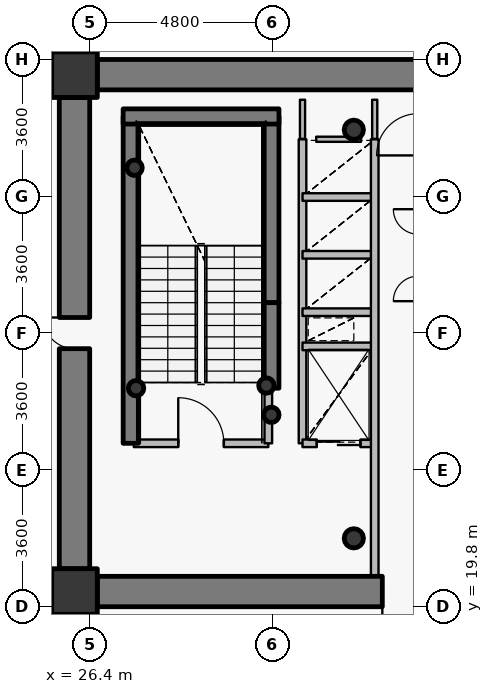
"""IFC4 building model, lengths in metres.
Left out: names, types, materials, properties, quantities, classifications, styles, units other than length and angle.
Written with IfcOpenShell. Run it as: python <this file> out.ifc"""

import sys

from ifc_helpers import new_model, si_unit, direction, frame, frame_2d, origin, origin_2d, place, context, subcontext, project, spatial, rectangle, hollow_circle, extrude, source, transform, mapped, element, fill, save


model = new_model("IFC4")
c1 = context("Model", 3, precision=1e-05, world=origin(), true_north=direction((0.0, 1.0)))
c2 = subcontext(c1, "Body", "Model", "MODEL_VIEW")
j1 = project(units=[si_unit("LENGTHUNIT", "METRE"), si_unit("PLANEANGLEUNIT", "RADIAN")], contexts=[c1])
p1 = place(None, origin())
s1 = spatial("IfcSite", under=j1, at=p1, CompositionType="ELEMENT")
p2 = place(p1, origin())
s2 = spatial("IfcBuilding", under=s1, at=p2, CompositionType="ELEMENT")
p3 = place(p2, frame((0.0, 0.0, 127.2)))
s3 = spatial("IfcBuildingStorey", under=s2, at=p3, CompositionType="ELEMENT", Elevation=127.2)
for number, where, z_axis, x_axis in (
    (1, (26.0, 20.2, 0.0), (0.0, 0.0, 1.0), (1.0, 0.0, 0.0)),
    (2, (26.0, 33.8, 0.0), (0.0, 0.0, 1.0), (1.0, 0.0, 0.0)),
):
    element("IfcColumn", number, at=place(p3, frame(where, z_axis=z_axis, x_axis=x_axis)), inside=s3, PredefinedType="COLUMN", context=c2, shape_type="SweptSolid", body=[
        extrude(rectangle(XDim=1.2, YDim=1.2, at=origin_2d()), origin(), (0.0, 0.0, 1.0), 3.75),
    ])
for number, where, z_axis, x_axis in (
    (3, (33.35, 21.6, 0.0), (0.0, 0.0, 1.0), (1.0, 0.0, 0.0)),
    (4, (33.35, 32.35, 0.0), (0.0, 0.0, 1.0), (1.0, 0.0, 0.0)),
):
    element("IfcColumn", number, at=place(p3, frame(where, z_axis=z_axis, x_axis=x_axis)), inside=s3, PredefinedType="COLUMN", context=c2, shape_type="SweptSolid", body=[
        extrude(hollow_circle(Radius=0.254, WallThickness=0.02, at=origin_2d()), origin(), (0.0, 0.0, 1.0), 3.75),
    ])
p4 = place(p3, frame((27.48, 24.1, 0.0), z_axis=(0.0, 0.0, 1.0), x_axis=(0.0, 1.0, 0.0)))
e5 = element("IfcWall", 5, at=p4, inside=s3, PredefinedType="SHEAR", context=c2, shape_type="SweptSolid", body=[
    extrude(rectangle(XDim=8.6, YDim=0.4, at=frame_2d((4.3, 0.0))), origin(), (0.0, 0.0, 1.0), 3.75),
])
p5 = place(p3, frame((31.18, 27.8, 0.0), z_axis=(0.0, 0.0, 1.0), x_axis=(0.0, 1.0, 0.0)))
e6 = element("IfcWall", 6, at=p5, inside=s3, PredefinedType="SHEAR", context=c2, shape_type="SweptSolid", body=[
    extrude(rectangle(XDim=4.9, YDim=0.4, at=frame_2d((2.45, 0.0))), origin(), (0.0, 0.0, 1.0), 3.75),
])
p6 = place(p3, frame((27.28, 32.7, 0.0), z_axis=(0.0, 0.0, 1.0), x_axis=(1.0, 0.0, 0.0)))
e7 = element("IfcWall", 7, at=p6, inside=s3, PredefinedType="SHEAR", context=c2, shape_type="SweptSolid", body=[
    extrude(rectangle(XDim=4.1, YDim=0.4, at=frame_2d((2.05, 0.0))), origin(), (0.0, 0.0, 1.0), 3.75),
])
for number, where, z_axis, x_axis in (
    (8, (27.58, 31.35, 0.0), (0.0, 0.0, 1.0), (1.0, 0.0, 0.0)),
    (9, (31.05, 25.62, 0.0), (0.0, 0.0, 1.0), (1.0, 0.0, 0.0)),
    (10, (31.18, 24.85, 0.0), (0.0, 0.0, 1.0), (1.0, 0.0, 0.0)),
    (11, (27.62, 25.55, 0.0), (0.0, 0.0, 1.0), (1.0, 0.0, 0.0)),
):
    element("IfcColumn", number, at=place(p3, frame(where, z_axis=z_axis, x_axis=x_axis)), inside=s3, PredefinedType="COLUMN", context=c2, shape_type="SweptSolid", body=[
        extrude(hollow_circle(Radius=0.203, WallThickness=0.016, at=origin_2d()), origin(), (0.0, 0.0, 1.0), 3.75),
    ])
p7 = place(p3, frame((26.6, 33.8, 0.0), z_axis=(0.0, 0.0, 1.0), x_axis=(1.0, 0.0, 0.0)))
e12 = element("IfcWall", 12, at=p7, inside=s3, PredefinedType="SHEAR", context=c2, shape_type="SweptSolid", body=[
    extrude(rectangle(XDim=18.8, YDim=0.8, at=frame_2d((9.4, 0.0))), origin(), (0.0, 0.0, 1.0), 2.95),
])
p8 = place(p3, frame((45.4, 20.2, 0.0), z_axis=(0.0, 0.0, 1.0), x_axis=(-1.0, 0.0, 0.0)))
e13 = element("IfcWall", 13, at=p8, inside=s3, PredefinedType="SHEAR", context=c2, shape_type="SweptSolid", body=[
    extrude(rectangle(XDim=18.8, YDim=0.8, at=frame_2d((9.4, 0.0))), origin(), (0.0, 0.0, 1.0), 2.95),
])
p9 = place(p8, frame((10.15, 0.0, 0.0)))
e14 = element("IfcOpeningElement", 14, at=p9, cuts=e13, PredefinedType="OPENING", context=c2, shape_type="SweptSolid", body=[
    extrude(rectangle(XDim=1.15, YDim=2.15, at=origin_2d()), frame((0.575, 0.41, 1.075), z_axis=(0.0, -1.0, 0.0), x_axis=(1.0, 0.0, 0.0)), (0.0, 0.0, 1.0), 0.82),
])
p10 = place(p3, frame((26.0, 20.8, 0.0), z_axis=(0.0, 0.0, 1.0), x_axis=(0.0, 1.0, 0.0)))
e15 = element("IfcWall", 15, at=p10, inside=s3, PredefinedType="SHEAR", context=c2, shape_type="SweptSolid", body=[
    extrude(rectangle(XDim=12.4, YDim=0.8, at=frame_2d((6.2, 0.0))), origin(), (0.0, 0.0, 1.0), 2.95),
])
p11 = place(p10, frame((5.79, 0.0, 0.0)))
e16 = element("IfcOpeningElement", 16, at=p11, cuts=e15, PredefinedType="OPENING", context=c2, shape_type="SweptSolid", body=[
    extrude(rectangle(XDim=0.82, YDim=2.1, at=origin_2d()), frame((0.41, 0.41, 1.05), z_axis=(0.0, -1.0, 0.0), x_axis=(1.0, 0.0, 0.0)), (0.0, 0.0, 1.0), 0.82),
])
p12 = place(p3, frame((31.18, 25.55, 0.0), z_axis=(0.0, 0.0, 1.0), x_axis=(0.0, 1.0, 0.0)))
e17 = element("IfcWall", 17, at=p12, inside=s3, PredefinedType="SHEAR", context=c2, shape_type="SweptSolid", body=[
    extrude(rectangle(XDim=2.25, YDim=0.4, at=frame_2d((1.125, 0.0))), origin(), (0.0, 0.0, 1.0), 3.1),
])
p13 = place(p3, frame((27.56, 24.1, 0.0), z_axis=(0.0, 0.0, 1.0), x_axis=(1.0, 0.0, 0.0)))
e18 = element("IfcWall", 18, at=p13, inside=s3, PredefinedType="PARTITIONING", context=c2, shape_type="SweptSolid", body=[
    extrude(rectangle(XDim=3.54, YDim=0.2, at=frame_2d((1.77, 0.0))), origin(), (0.0, 0.0, 1.0), 3.5),
])
p14 = place(p13, frame((1.17, 0.0, 0.0)))
e19 = element("IfcOpeningElement", 19, at=p14, cuts=e18, PredefinedType="OPENING", context=c2, shape_type="SweptSolid", body=[
    extrude(rectangle(XDim=1.2, YDim=2.15, at=origin_2d()), frame((0.6, 0.11, 1.075), z_axis=(0.0, -1.0, 0.0), x_axis=(1.0, 0.0, 0.0)), (0.0, 0.0, 1.0), 0.22),
])
p15 = place(p3, frame((31.1, 24.1, 0.0), z_axis=(0.0, 0.0, 1.0), x_axis=(0.0, 1.0, 0.0)))
e20 = element("IfcWall", 20, at=p15, inside=s3, PredefinedType="PARTITIONING", context=c2, shape_type="SweptSolid", body=[
    extrude(rectangle(XDim=1.44, YDim=0.2, at=frame_2d((0.72, 0.0))), origin(), (0.0, 0.0, 1.0), 3.5),
])
p16 = place(p3, frame((32.0, 24.1, 0.0), z_axis=(0.0, 0.0, 1.0), x_axis=(0.0, 1.0, 0.0)))
e21 = element("IfcWall", 21, at=p16, inside=s3, PredefinedType="PARTITIONING", context=c2, shape_type="SweptSolid", body=[
    extrude(rectangle(XDim=8.0, YDim=0.2, at=frame_2d((4.0, 0.0))), origin(), (0.0, 0.0, 1.0), 3.5),
])
p17 = place(p3, frame((32.0, 24.1, 0.0), z_axis=(0.0, 0.0, 1.0), x_axis=(1.0, 0.0, 0.0)))
e22 = element("IfcWall", 22, at=p17, inside=s3, PredefinedType="PARTITIONING", context=c2, shape_type="SweptSolid", body=[
    extrude(rectangle(XDim=1.9, YDim=0.2, at=frame_2d((0.95, 0.0))), origin(), (0.0, 0.0, 1.0), 3.085),
])
p18 = place(p17, frame((0.375, 0.0, 0.0)))
e23 = element("IfcOpeningElement", 23, at=p18, cuts=e22, PredefinedType="OPENING", context=c2, shape_type="SweptSolid", body=[
    extrude(rectangle(XDim=1.15, YDim=2.15, at=origin_2d()), frame((0.575, 0.11, 1.075), z_axis=(0.0, -1.0, 0.0), x_axis=(1.0, 0.0, 0.0)), (0.0, 0.0, 1.0), 0.22),
])
for number, where, z_axis, x_axis in (
    (24, (32.0, 26.65, 0.0), (0.0, 0.0, 1.0), (1.0, 0.0, 0.0)),
    (25, (32.0, 27.55, 0.0), (0.0, 0.0, 1.0), (1.0, 0.0, 0.0)),
    (26, (32.0, 29.06, 0.0), (0.0, 0.0, 1.0), (1.0, 0.0, 0.0)),
    (27, (32.0, 30.58, 0.0), (0.0, 0.0, 1.0), (1.0, 0.0, 0.0)),
):
    element("IfcWall", number, at=place(p3, frame(where, z_axis=z_axis, x_axis=x_axis)), inside=s3, PredefinedType="PARTITIONING", context=c2, shape_type="SweptSolid", body=[
        extrude(rectangle(XDim=1.9, YDim=0.2, at=frame_2d((0.95, 0.0))), origin(), (0.0, 0.0, 1.0), 3.085),
    ])
p19 = place(p3, frame((33.9, 20.6, 0.0), z_axis=(0.0, 0.0, 1.0), x_axis=(0.0, 1.0, 0.0)))
e28 = element("IfcWall", 28, at=p19, inside=s3, PredefinedType="PARTITIONING", context=c2, shape_type="SweptSolid", body=[
    extrude(rectangle(XDim=11.5, YDim=0.2, at=frame_2d((5.75, 0.0))), origin(), (0.0, 0.0, 1.0), 3.085),
])
p20 = place(p3, frame((32.36, 32.1, 0.0), z_axis=(0.0, 0.0, 1.0), x_axis=(1.0, 0.0, 0.0)))
e29 = element("IfcWall", 29, at=p20, inside=s3, PredefinedType="PARTITIONING", context=c2, shape_type="SweptSolid", body=[
    extrude(rectangle(XDim=1.18, YDim=0.135, at=frame_2d((0.59, 0.0))), origin(), (0.0, 0.0, 1.0), 3.085),
])
p21 = place(p3, frame((32.0, 33.14, 0.0), z_axis=(0.0, 0.0, 1.0), x_axis=(0.0, -1.0, 0.0)))
e30 = element("IfcWall", 30, at=p21, inside=s3, PredefinedType="PARTITIONING", context=c2, shape_type="SweptSolid", body=[
    extrude(rectangle(XDim=1.03, YDim=0.135, at=frame_2d((0.515, 0.0))), origin(), (0.0, 0.0, 1.0), 3.035),
])
p22 = place(p3, frame((33.9, 32.11, 0.0), z_axis=(0.0, 0.0, 1.0), x_axis=(0.0, 1.0, 0.0)))
e31 = element("IfcWall", 31, at=p22, inside=s3, PredefinedType="PARTITIONING", context=c2, shape_type="SweptSolid", body=[
    extrude(rectangle(XDim=1.03, YDim=0.135, at=frame_2d((0.515, 0.0))), origin(), (0.0, 0.0, 1.0), 3.085),
])
p23 = place(p3, frame((26.59, 34.2, 0.0), z_axis=(0.0, 0.0, 1.0), x_axis=(-1.0, 0.0, 0.0)))
e32 = element("IfcWall", 32, at=p23, inside=s3, PredefinedType="PARTITIONING", context=c2, shape_type="SweptSolid", body=[
    extrude(rectangle(XDim=0.99, YDim=0.135, at=frame_2d((0.495, 0.0))), origin(), (0.0, 0.0, 1.0), 2.935),
])
p24 = place(p3, frame((25.6, 33.893, 0.0), z_axis=(0.0, 0.0, 1.0), x_axis=(0.0, -1.0, 0.0)))
e33 = element("IfcWall", 33, at=p24, inside=s3, PredefinedType="PARTITIONING", context=c2, shape_type="SweptSolid", body=[
    extrude(rectangle(XDim=0.683, YDim=0.135, at=frame_2d((0.341, 0.0))), origin(), (0.0, 0.0, 1.0), 3.5),
])
p25 = place(p3, frame((25.6, 20.79, 0.0), z_axis=(0.0, 0.0, 1.0), x_axis=(0.0, -1.0, 0.0)))
e34 = element("IfcWall", 34, at=p25, inside=s3, PredefinedType="PARTITIONING", context=c2, shape_type="SweptSolid", body=[
    extrude(rectangle(XDim=0.99, YDim=0.135, at=frame_2d((0.495, 0.0))), origin(), (0.0, 0.0, 1.0), 3.5),
])
p26 = place(p3, frame((25.907, 19.8, 0.0), z_axis=(0.0, 0.0, 1.0), x_axis=(1.0, 0.0, 0.0)))
e35 = element("IfcWall", 35, at=p26, inside=s3, PredefinedType="PARTITIONING", context=c2, shape_type="SweptSolid", body=[
    extrude(rectangle(XDim=0.683, YDim=0.135, at=frame_2d((0.341, 0.0))), origin(), (0.0, 0.0, 1.0), 2.935),
])
m1 = source(origin(), c2, "Body", "SweptSolid", [
    extrude(rectangle(XDim=0.82, YDim=2.1, at=origin_2d()), frame((0.41, 0.025, 1.05), z_axis=(0.0, -1.0, 0.0), x_axis=(1.0, 0.0, 0.0)), (0.0, 0.0, 1.0), 0.05),
])
p27 = place(p11, origin())
e36 = element("IfcDoor", 36, at=p27, inside=s3, OperationType="SINGLE_SWING_RIGHT", PredefinedType="DOOR", context=c2, shape_type="MappedRepresentation", body=[
    mapped(m1, transform((0.0, 0.0, 0.0), x_axis=(1.0, 0.0, 0.0), y_axis=(0.0, 1.0, 0.0), z_axis=(0.0, 0.0, 1.0), scale=1.0)),
])
fill(e16, e36)
m2 = source(origin(), c2, "Body", "SweptSolid", [
    extrude(rectangle(XDim=1.15, YDim=2.15, at=origin_2d()), frame((0.575, 0.025, 1.075), z_axis=(0.0, -1.0, 0.0), x_axis=(1.0, 0.0, 0.0)), (0.0, 0.0, 1.0), 0.05),
])
p28 = place(p9, origin())
e37 = element("IfcDoor", 37, at=p28, inside=s3, OperationType="SINGLE_SWING_RIGHT", PredefinedType="DOOR", context=c2, shape_type="MappedRepresentation", body=[
    mapped(m2, transform((0.0, 0.0, 0.0), x_axis=(1.0, 0.0, 0.0), y_axis=(0.0, 1.0, 0.0), z_axis=(0.0, 0.0, 1.0), scale=1.0)),
])
fill(e14, e37)
m3 = source(origin(), c2, "Body", "SweptSolid", [
    extrude(rectangle(XDim=1.2, YDim=2.15, at=origin_2d()), frame((0.6, 0.025, 1.075), z_axis=(0.0, -1.0, 0.0), x_axis=(1.0, 0.0, 0.0)), (0.0, 0.0, 1.0), 0.05),
])
p29 = place(p14, origin())
e38 = element("IfcDoor", 38, at=p29, inside=s3, OperationType="SINGLE_SWING_LEFT", PredefinedType="DOOR", context=c2, shape_type="MappedRepresentation", body=[
    mapped(m3, transform((0.0, 0.0, 0.0), x_axis=(1.0, 0.0, 0.0), y_axis=(0.0, 1.0, 0.0), z_axis=(0.0, 0.0, 1.0), scale=1.0)),
])
fill(e19, e38)
m4 = source(origin(), c2, "Body", "SweptSolid", [
    extrude(rectangle(XDim=1.15, YDim=2.15, at=origin_2d()), frame((0.575, 0.025, 1.075), z_axis=(0.0, -1.0, 0.0), x_axis=(1.0, 0.0, 0.0)), (0.0, 0.0, 1.0), 0.05),
])
p30 = place(p18, origin())
e39 = element("IfcDoor", 39, at=p30, inside=s3, OperationType="DOUBLE_DOOR_SLIDING", PredefinedType="USERDEFINED", context=c2, shape_type="MappedRepresentation", body=[
    mapped(m4, transform((0.0, 0.0, 0.0), x_axis=(1.0, 0.0, 0.0), y_axis=(0.0, 1.0, 0.0), z_axis=(0.0, 0.0, 1.0), scale=1.0)),
])
fill(e23, e39)
save(model, sys.argv[1])
